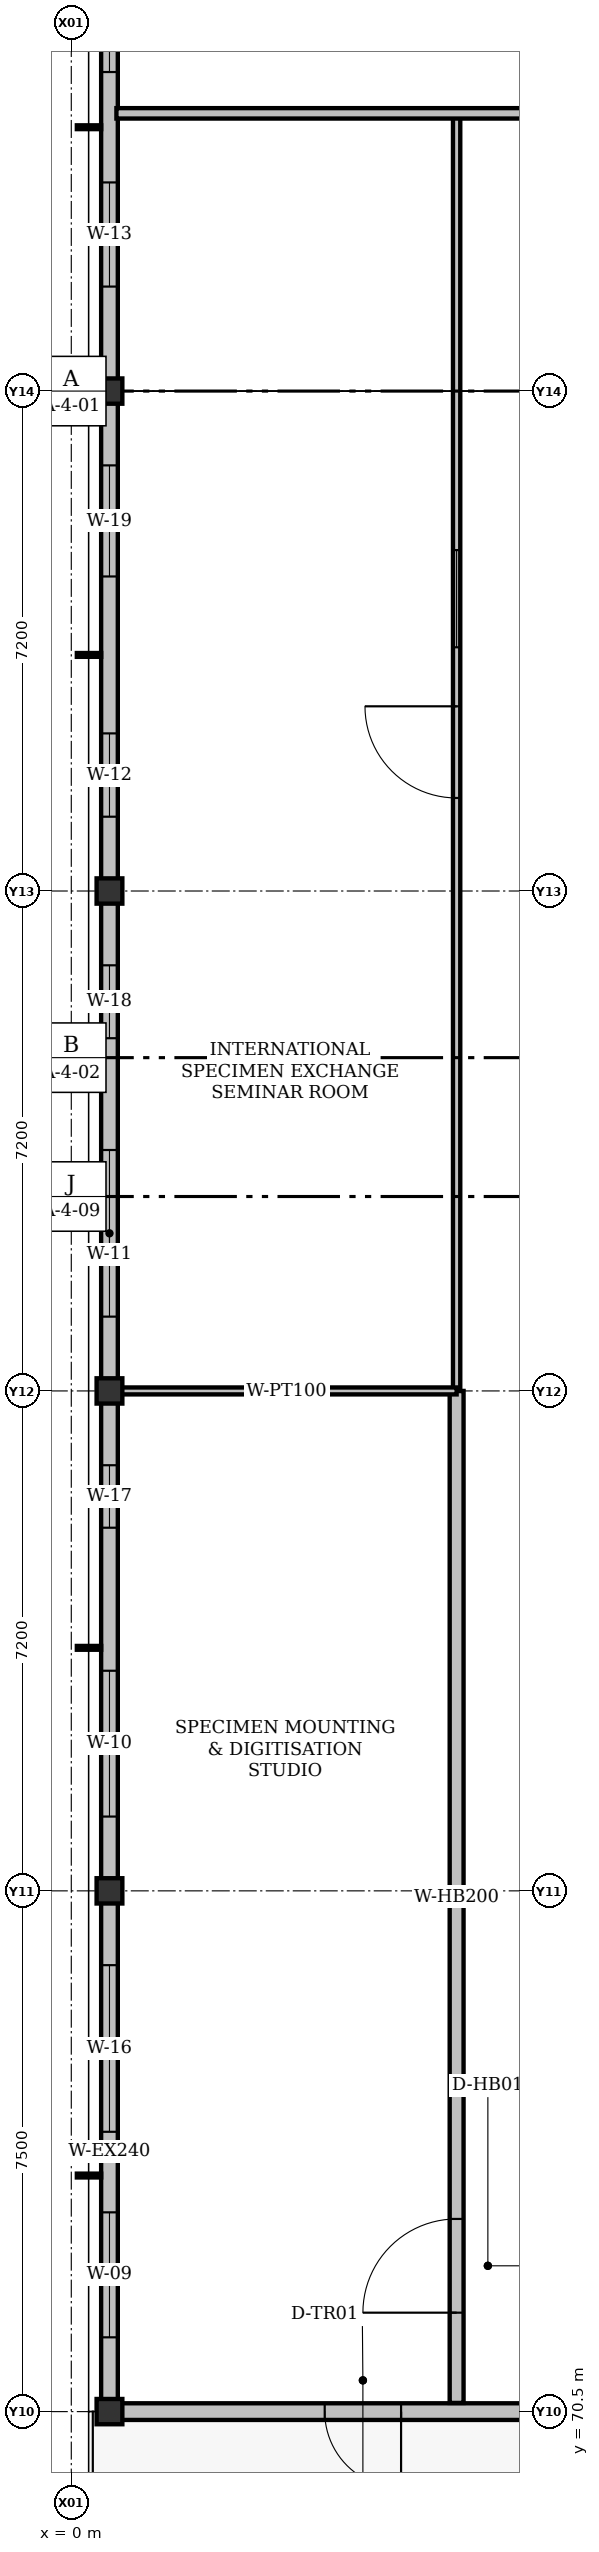
"""IFC4 building model, lengths in metres.
Left out: names, types, materials, properties, quantities, classifications, styles, units other than length and angle.
Written with IfcOpenShell. Run it as: python <this file> out.ifc"""

import sys

from ifc_helpers import new_model, si_unit, direction, frame, frame_2d, origin, origin_2d, place, context, subcontext, project, spatial, rectangle, i_section, extrude, element, fill, save


model = new_model("IFC4")
c1 = context("Model", 3, precision=1e-05, world=origin(), true_north=direction((0.0, 1.0)))
c2 = subcontext(c1, "Body", "Model", "MODEL_VIEW")
j1 = project(units=[si_unit("LENGTHUNIT", "METRE"), si_unit("PLANEANGLEUNIT", "RADIAN")], contexts=[c1])
p1 = place(None, origin())
s1 = spatial("IfcSite", under=j1, at=p1, CompositionType="ELEMENT")
p2 = place(p1, origin())
s2 = spatial("IfcBuilding", under=s1, at=p2, CompositionType="ELEMENT")
p3 = place(p2, frame((0.0, 0.0, 35.1)))
s3 = spatial("IfcBuildingStorey", under=s2, at=p3, CompositionType="ELEMENT", Elevation=35.1)
for number, where, z_axis, x_axis in (
    (1, (0.55, 70.5, 0.0), (0.0, 0.0, 1.0), (1.0, 0.0, 0.0)),
    (2, (0.55, 78.0, 0.0), (0.0, 0.0, 1.0), (1.0, 0.0, 0.0)),
    (3, (0.55, 85.2, 0.0), (0.0, 0.0, 1.0), (1.0, 0.0, 0.0)),
    (4, (0.55, 92.4, 0.0), (0.0, 0.0, 1.0), (1.0, 0.0, 0.0)),
    (5, (0.55, 99.6, 0.0), (0.0, 0.0, 1.0), (1.0, 0.0, 0.0)),
):
    element("IfcColumn", number, at=place(p3, frame(where, z_axis=z_axis, x_axis=x_axis)), inside=s3, PredefinedType="COLUMN", context=c2, shape_type="SweptSolid", body=[
        extrude(i_section(OverallWidth=0.371, OverallDepth=0.364, WebThickness=0.013, FlangeThickness=0.022, FilletRadius=0.015, at=origin_2d()), origin(), (0.0, 0.0, 1.0), 4.2),
    ])
p4 = place(p3, frame((0.55, 70.5, 0.0), z_axis=(0.0, 0.0, 1.0), x_axis=(0.0, 1.0, 0.0)))
e6 = element("IfcWall", 6, at=p4, inside=s3, PredefinedType="SOLIDWALL", context=c2, shape_type="SweptSolid", body=[
    extrude(rectangle(XDim=7.5, YDim=0.24, at=frame_2d((3.75, 0.0))), origin(), (0.0, 0.0, 1.0), 3.577),
])
p5 = place(p4, frame((1.07, 0.0, 0.92)))
e7 = element("IfcOpeningElement", 7, at=p5, cuts=e6, PredefinedType="OPENING", context=c2, shape_type="SweptSolid", body=[
    extrude(rectangle(XDim=1.8, YDim=1.55, at=frame_2d((0.9, 0.775))), frame((0.0, 0.12, 0.0), z_axis=(0.0, -1.0, 0.0), x_axis=(1.0, 0.0, 0.0)), (0.0, 0.0, 1.0), 0.24),
])
p6 = place(p4, frame((4.03, 0.0, 0.92)))
e8 = element("IfcOpeningElement", 8, at=p6, cuts=e6, PredefinedType="OPENING", context=c2, shape_type="SweptSolid", body=[
    extrude(rectangle(XDim=2.4, YDim=1.7, at=frame_2d((1.2, 0.85))), frame((0.0, 0.12, 0.0), z_axis=(0.0, -1.0, 0.0), x_axis=(1.0, 0.0, 0.0)), (0.0, 0.0, 1.0), 0.24),
])
p7 = place(p3, frame((0.55, 78.0, 0.0), z_axis=(0.0, 0.0, 1.0), x_axis=(0.0, 1.0, 0.0)))
e9 = element("IfcWall", 9, at=p7, inside=s3, PredefinedType="SOLIDWALL", context=c2, shape_type="SweptSolid", body=[
    extrude(rectangle(XDim=7.2, YDim=0.24, at=frame_2d((3.6, 0.0))), origin(), (0.0, 0.0, 1.0), 3.577),
])
p8 = place(p7, frame((1.07, 0.0, 0.92)))
e10 = element("IfcOpeningElement", 10, at=p8, cuts=e9, PredefinedType="OPENING", context=c2, shape_type="SweptSolid", body=[
    extrude(rectangle(XDim=2.1, YDim=1.55, at=frame_2d((1.05, 0.775))), frame((0.0, 0.12, 0.0), z_axis=(0.0, -1.0, 0.0), x_axis=(1.0, 0.0, 0.0)), (0.0, 0.0, 1.0), 0.24),
])
p9 = place(p7, frame((5.23, 0.0, 0.92)))
e11 = element("IfcOpeningElement", 11, at=p9, cuts=e9, PredefinedType="OPENING", context=c2, shape_type="SweptSolid", body=[
    extrude(rectangle(XDim=0.9, YDim=1.3, at=frame_2d((0.45, 0.65))), frame((0.0, 0.12, 0.0), z_axis=(0.0, -1.0, 0.0), x_axis=(1.0, 0.0, 0.0)), (0.0, 0.0, 1.0), 0.24),
])
p10 = place(p3, frame((0.55, 85.2, 0.0), z_axis=(0.0, 0.0, 1.0), x_axis=(0.0, 1.0, 0.0)))
e12 = element("IfcWall", 12, at=p10, inside=s3, PredefinedType="SOLIDWALL", context=c2, shape_type="SweptSolid", body=[
    extrude(rectangle(XDim=7.2, YDim=0.24, at=frame_2d((3.6, 0.0))), origin(), (0.0, 0.0, 1.0), 3.577),
])
p11 = place(p10, frame((1.07, 0.0, 0.92)))
e13 = element("IfcOpeningElement", 13, at=p11, cuts=e12, PredefinedType="OPENING", context=c2, shape_type="SweptSolid", body=[
    extrude(rectangle(XDim=2.4, YDim=1.55, at=frame_2d((1.2, 0.775))), frame((0.0, 0.12, 0.0), z_axis=(0.0, -1.0, 0.0), x_axis=(1.0, 0.0, 0.0)), (0.0, 0.0, 1.0), 0.24),
])
p12 = place(p10, frame((5.08, 0.0, 0.92)))
e14 = element("IfcOpeningElement", 14, at=p12, cuts=e12, PredefinedType="OPENING", context=c2, shape_type="SweptSolid", body=[
    extrude(rectangle(XDim=1.05, YDim=1.3, at=frame_2d((0.525, 0.65))), frame((0.0, 0.12, 0.0), z_axis=(0.0, -1.0, 0.0), x_axis=(1.0, 0.0, 0.0)), (0.0, 0.0, 1.0), 0.24),
])
p13 = place(p3, frame((0.55, 92.4, 0.0), z_axis=(0.0, 0.0, 1.0), x_axis=(0.0, 1.0, 0.0)))
e15 = element("IfcWall", 15, at=p13, inside=s3, PredefinedType="SOLIDWALL", context=c2, shape_type="SweptSolid", body=[
    extrude(rectangle(XDim=7.2, YDim=0.24, at=frame_2d((3.6, 0.0))), origin(), (0.0, 0.0, 1.0), 3.577),
])
p14 = place(p13, frame((1.07, 0.0, 0.92)))
e16 = element("IfcOpeningElement", 16, at=p14, cuts=e15, PredefinedType="OPENING", context=c2, shape_type="SweptSolid", body=[
    extrude(rectangle(XDim=1.2, YDim=1.7, at=frame_2d((0.6, 0.85))), frame((0.0, 0.12, 0.0), z_axis=(0.0, -1.0, 0.0), x_axis=(1.0, 0.0, 0.0)), (0.0, 0.0, 1.0), 0.24),
])
p15 = place(p13, frame((4.53, 0.0, 0.92)))
e17 = element("IfcOpeningElement", 17, at=p15, cuts=e15, PredefinedType="OPENING", context=c2, shape_type="SweptSolid", body=[
    extrude(rectangle(XDim=1.6, YDim=1.35, at=frame_2d((0.8, 0.675))), frame((0.0, 0.12, 0.0), z_axis=(0.0, -1.0, 0.0), x_axis=(1.0, 0.0, 0.0)), (0.0, 0.0, 1.0), 0.24),
])
p16 = place(p3, frame((0.55, 99.6, 0.0), z_axis=(0.0, 0.0, 1.0), x_axis=(0.0, 1.0, 0.0)))
e18 = element("IfcWall", 18, at=p16, inside=s3, PredefinedType="SOLIDWALL", context=c2, shape_type="SweptSolid", body=[
    extrude(rectangle(XDim=7.2, YDim=0.24, at=frame_2d((3.6, 0.0))), origin(), (0.0, 0.0, 1.0), 3.577),
])
p17 = place(p16, frame((1.505, 0.0, 0.92)))
e19 = element("IfcOpeningElement", 19, at=p17, cuts=e18, PredefinedType="OPENING", context=c2, shape_type="SweptSolid", body=[
    extrude(rectangle(XDim=1.5, YDim=1.7, at=frame_2d((0.75, 0.85))), frame((0.0, 0.12, 0.0), z_axis=(0.0, -1.0, 0.0), x_axis=(1.0, 0.0, 0.0)), (0.0, 0.0, 1.0), 0.24),
])
p18 = place(p16, frame((4.595, 0.0, 0.92)))
e20 = element("IfcOpeningElement", 20, at=p18, cuts=e18, PredefinedType="OPENING", context=c2, shape_type="SweptSolid", body=[
    extrude(rectangle(XDim=1.5, YDim=1.4, at=frame_2d((0.75, 0.7))), frame((0.0, 0.12, 0.0), z_axis=(0.0, -1.0, 0.0), x_axis=(1.0, 0.0, 0.0)), (0.0, 0.0, 1.0), 0.24),
])
p19 = place(p3, frame((7.85, 70.5, 0.0), z_axis=(0.0, 0.0, 1.0), x_axis=(-1.0, 0.0, 0.0)))
e21 = element("IfcWall", 21, at=p19, inside=s3, PredefinedType="SOLIDWALL", context=c2, shape_type="SweptSolid", body=[
    extrude(rectangle(XDim=7.3, YDim=0.24, at=frame_2d((3.65, 0.0))), origin(), (0.0, 0.0, 1.0), 3.577),
])
p20 = place(p19, frame((3.1, 0.0, 0.0)))
e22 = element("IfcOpeningElement", 22, at=p20, cuts=e21, PredefinedType="OPENING", context=c2, shape_type="SweptSolid", body=[
    extrude(rectangle(XDim=1.1, YDim=2.2, at=frame_2d((0.55, 1.1))), frame((0.0, 0.12, 0.0), z_axis=(0.0, -1.0, 0.0), x_axis=(1.0, 0.0, 0.0)), (0.0, 0.0, 1.0), 0.24),
])
p21 = place(p3, frame((5.55, 70.625, 0.0), z_axis=(0.0, 0.0, 1.0), x_axis=(0.0, 1.0, 0.0)))
e23 = element("IfcWall", 23, at=p21, inside=s3, PredefinedType="SOLIDWALL", context=c2, shape_type="SweptSolid", body=[
    extrude(rectangle(XDim=14.575, YDim=0.2, at=frame_2d((7.288, 0.0))), origin(), (0.0, 0.0, 1.0), 3.451),
])
p22 = place(p21, frame((1.3, 0.0, 0.0)))
e24 = element("IfcOpeningElement", 24, at=p22, cuts=e23, PredefinedType="OPENING", context=c2, shape_type="SweptSolid", body=[
    extrude(rectangle(XDim=1.35, YDim=2.25, at=frame_2d((0.675, 1.125))), frame((0.0, 0.1, 0.0), z_axis=(0.0, -1.0, 0.0), x_axis=(1.0, 0.0, 0.0)), (0.0, 0.0, 1.0), 0.2),
])
p23 = place(p3, frame((5.55, 85.2, 0.0), z_axis=(0.0, 0.0, 1.0), x_axis=(0.0, 1.0, 0.0)))
e25 = element("IfcWall", 25, at=p23, inside=s3, PredefinedType="PARTITIONING", context=c2, shape_type="SweptSolid", body=[
    extrude(rectangle(XDim=18.4, YDim=0.105, at=frame_2d((9.2, 0.0))), origin(), (0.0, 0.0, 1.0), 3.451),
])
p24 = place(p23, frame((8.54, 0.0, 0.0)))
e26 = element("IfcOpeningElement", 26, at=p24, cuts=e25, PredefinedType="OPENING", context=c2, shape_type="SweptSolid", body=[
    extrude(rectangle(XDim=1.32, YDim=2.18, at=frame_2d((0.66, 1.09))), frame((0.0, 0.052, 0.0), z_axis=(0.0, -1.0, 0.0), x_axis=(1.0, 0.0, 0.0)), (0.0, 0.0, 1.0), 0.105),
])
p25 = place(p23, frame((10.71, 0.0, 0.92)))
e27 = element("IfcOpeningElement", 27, at=p25, cuts=e25, PredefinedType="OPENING", context=c2, shape_type="SweptSolid", body=[
    extrude(rectangle(XDim=1.4, YDim=1.2, at=frame_2d((0.7, 0.6))), frame((0.0, 0.052, 0.0), z_axis=(0.0, -1.0, 0.0), x_axis=(1.0, 0.0, 0.0)), (0.0, 0.0, 1.0), 0.105),
])
p26 = place(p3, frame((0.65, 85.2, 0.0), z_axis=(0.0, 0.0, 1.0), x_axis=(1.0, 0.0, 0.0)))
e28 = element("IfcWall", 28, at=p26, inside=s3, PredefinedType="PARTITIONING", context=c2, shape_type="SweptSolid", body=[
    extrude(rectangle(XDim=4.9, YDim=0.1, at=frame_2d((2.45, 0.0))), origin(), (0.0, 0.0, 1.0), 3.451),
])
p27 = place(p3, frame((0.65, 103.6, 0.0), z_axis=(0.0, 0.0, 1.0), x_axis=(1.0, 0.0, 0.0)))
e29 = element("IfcWall", 29, at=p27, inside=s3, PredefinedType="PARTITIONING", context=c2, shape_type="SweptSolid", body=[
    extrude(rectangle(XDim=19.1, YDim=0.15, at=frame_2d((9.55, 0.0))), origin(), (0.0, 0.0, 1.0), 3.527),
])
p28 = place(p27, frame((9.21, 0.0, 0.0)))
e30 = element("IfcOpeningElement", 30, at=p28, cuts=e29, PredefinedType="OPENING", context=c2, shape_type="SweptSolid", body=[
    extrude(rectangle(XDim=1.48, YDim=2.28, at=frame_2d((0.74, 1.14))), frame((0.0, 0.075, 0.0), z_axis=(0.0, -1.0, 0.0), x_axis=(1.0, 0.0, 0.0)), (0.0, 0.0, 1.0), 0.15),
])
p29 = place(p27, frame((11.54, 0.0, 0.92)))
e31 = element("IfcOpeningElement", 31, at=p29, cuts=e29, PredefinedType="OPENING", context=c2, shape_type="SweptSolid", body=[
    extrude(rectangle(XDim=1.0, YDim=1.3, at=frame_2d((0.5, 0.65))), frame((0.0, 0.075, 0.0), z_axis=(0.0, -1.0, 0.0), x_axis=(1.0, 0.0, 0.0)), (0.0, 0.0, 1.0), 0.15),
])
p30 = place(p5, origin())
e32 = element("IfcWindow", 32, at=p30, inside=s3, PartitioningType="DOUBLE_PANEL_VERTICAL", PredefinedType="WINDOW", context=c2, shape_type="SweptSolid", body=[
    extrude(rectangle(XDim=1.8, YDim=1.55, at=frame_2d((0.9, 0.775))), frame((0.0, 0.03, 0.0), z_axis=(0.0, -1.0, 0.0), x_axis=(1.0, 0.0, 0.0)), (0.0, 0.0, 1.0), 0.06),
])
fill(e7, e32)
p31 = place(p6, origin())
e33 = element("IfcWindow", 33, at=p31, inside=s3, PartitioningType="DOUBLE_PANEL_VERTICAL", PredefinedType="WINDOW", context=c2, shape_type="SweptSolid", body=[
    extrude(rectangle(XDim=2.4, YDim=1.7, at=frame_2d((1.2, 0.85))), frame((0.0, 0.03, 0.0), z_axis=(0.0, -1.0, 0.0), x_axis=(1.0, 0.0, 0.0)), (0.0, 0.0, 1.0), 0.06),
])
fill(e8, e33)
p32 = place(p8, origin())
e34 = element("IfcWindow", 34, at=p32, inside=s3, PartitioningType="DOUBLE_PANEL_VERTICAL", PredefinedType="WINDOW", context=c2, shape_type="SweptSolid", body=[
    extrude(rectangle(XDim=2.1, YDim=1.55, at=frame_2d((1.05, 0.775))), frame((0.0, 0.03, 0.0), z_axis=(0.0, -1.0, 0.0), x_axis=(1.0, 0.0, 0.0)), (0.0, 0.0, 1.0), 0.06),
])
fill(e10, e34)
p33 = place(p9, origin())
e35 = element("IfcWindow", 35, at=p33, inside=s3, PartitioningType="SINGLE_PANEL", PredefinedType="WINDOW", context=c2, shape_type="SweptSolid", body=[
    extrude(rectangle(XDim=0.9, YDim=1.3, at=frame_2d((0.45, 0.65))), frame((0.0, 0.03, 0.0), z_axis=(0.0, -1.0, 0.0), x_axis=(1.0, 0.0, 0.0)), (0.0, 0.0, 1.0), 0.06),
])
fill(e11, e35)
p34 = place(p11, origin())
e36 = element("IfcWindow", 36, at=p34, inside=s3, PartitioningType="DOUBLE_PANEL_VERTICAL", PredefinedType="WINDOW", context=c2, shape_type="SweptSolid", body=[
    extrude(rectangle(XDim=2.4, YDim=1.55, at=frame_2d((1.2, 0.775))), frame((0.0, 0.03, 0.0), z_axis=(0.0, -1.0, 0.0), x_axis=(1.0, 0.0, 0.0)), (0.0, 0.0, 1.0), 0.06),
])
fill(e13, e36)
p35 = place(p12, origin())
e37 = element("IfcWindow", 37, at=p35, inside=s3, PartitioningType="SINGLE_PANEL", PredefinedType="WINDOW", context=c2, shape_type="SweptSolid", body=[
    extrude(rectangle(XDim=1.05, YDim=1.3, at=frame_2d((0.525, 0.65))), frame((0.0, 0.03, 0.0), z_axis=(0.0, -1.0, 0.0), x_axis=(1.0, 0.0, 0.0)), (0.0, 0.0, 1.0), 0.06),
])
fill(e14, e37)
p36 = place(p14, origin())
e38 = element("IfcWindow", 38, at=p36, inside=s3, PartitioningType="SINGLE_PANEL", PredefinedType="WINDOW", context=c2, shape_type="SweptSolid", body=[
    extrude(rectangle(XDim=1.2, YDim=1.7, at=frame_2d((0.6, 0.85))), frame((0.0, 0.03, 0.0), z_axis=(0.0, -1.0, 0.0), x_axis=(1.0, 0.0, 0.0)), (0.0, 0.0, 1.0), 0.06),
])
fill(e16, e38)
p37 = place(p15, origin())
e39 = element("IfcWindow", 39, at=p37, inside=s3, PartitioningType="DOUBLE_PANEL_VERTICAL", PredefinedType="WINDOW", context=c2, shape_type="SweptSolid", body=[
    extrude(rectangle(XDim=1.6, YDim=1.35, at=frame_2d((0.8, 0.675))), frame((0.0, 0.03, 0.0), z_axis=(0.0, -1.0, 0.0), x_axis=(1.0, 0.0, 0.0)), (0.0, 0.0, 1.0), 0.06),
])
fill(e17, e39)
p38 = place(p17, origin())
e40 = element("IfcWindow", 40, at=p38, inside=s3, PartitioningType="SINGLE_PANEL", PredefinedType="WINDOW", context=c2, shape_type="SweptSolid", body=[
    extrude(rectangle(XDim=1.5, YDim=1.7, at=frame_2d((0.75, 0.85))), frame((0.0, 0.03, 0.0), z_axis=(0.0, -1.0, 0.0), x_axis=(1.0, 0.0, 0.0)), (0.0, 0.0, 1.0), 0.06),
])
fill(e19, e40)
p39 = place(p18, origin())
e41 = element("IfcWindow", 41, at=p39, inside=s3, PartitioningType="SINGLE_PANEL", PredefinedType="WINDOW", context=c2, shape_type="SweptSolid", body=[
    extrude(rectangle(XDim=1.5, YDim=1.4, at=frame_2d((0.75, 0.7))), frame((0.0, 0.03, 0.0), z_axis=(0.0, -1.0, 0.0), x_axis=(1.0, 0.0, 0.0)), (0.0, 0.0, 1.0), 0.06),
])
fill(e20, e41)
p40 = place(p20, origin())
e42 = element("IfcDoor", 42, at=p40, inside=s3, OperationType="SINGLE_SWING_LEFT", PredefinedType="DOOR", context=c2, shape_type="SweptSolid", body=[
    extrude(rectangle(XDim=1.1, YDim=2.2, at=frame_2d((0.55, 1.1))), frame((0.0, 0.025, 0.0), z_axis=(0.0, -1.0, 0.0), x_axis=(1.0, 0.0, 0.0)), (0.0, 0.0, 1.0), 0.05),
])
fill(e22, e42)
p41 = place(p22, origin())
e43 = element("IfcDoor", 43, at=p41, inside=s3, OperationType="SINGLE_SWING_LEFT", PredefinedType="DOOR", context=c2, shape_type="SweptSolid", body=[
    extrude(rectangle(XDim=1.35, YDim=2.25, at=frame_2d((0.675, 1.125))), frame((0.0, 0.025, 0.0), z_axis=(0.0, -1.0, 0.0), x_axis=(1.0, 0.0, 0.0)), (0.0, 0.0, 1.0), 0.05),
])
fill(e24, e43)
p42 = place(p24, origin())
e44 = element("IfcDoor", 44, at=p42, inside=s3, OperationType="SINGLE_SWING_RIGHT", PredefinedType="DOOR", context=c2, shape_type="SweptSolid", body=[
    extrude(rectangle(XDim=1.32, YDim=2.18, at=frame_2d((0.66, 1.09))), frame((0.0, 0.025, 0.0), z_axis=(0.0, -1.0, 0.0), x_axis=(1.0, 0.0, 0.0)), (0.0, 0.0, 1.0), 0.05),
])
fill(e26, e44)
p43 = place(p25, origin())
e45 = element("IfcWindow", 45, at=p43, inside=s3, PartitioningType="SINGLE_PANEL", PredefinedType="WINDOW", context=c2, shape_type="SweptSolid", body=[
    extrude(rectangle(XDim=1.4, YDim=1.2, at=frame_2d((0.7, 0.6))), frame((0.0, 0.03, 0.0), z_axis=(0.0, -1.0, 0.0), x_axis=(1.0, 0.0, 0.0)), (0.0, 0.0, 1.0), 0.06),
])
fill(e27, e45)
save(model, sys.argv[1])
